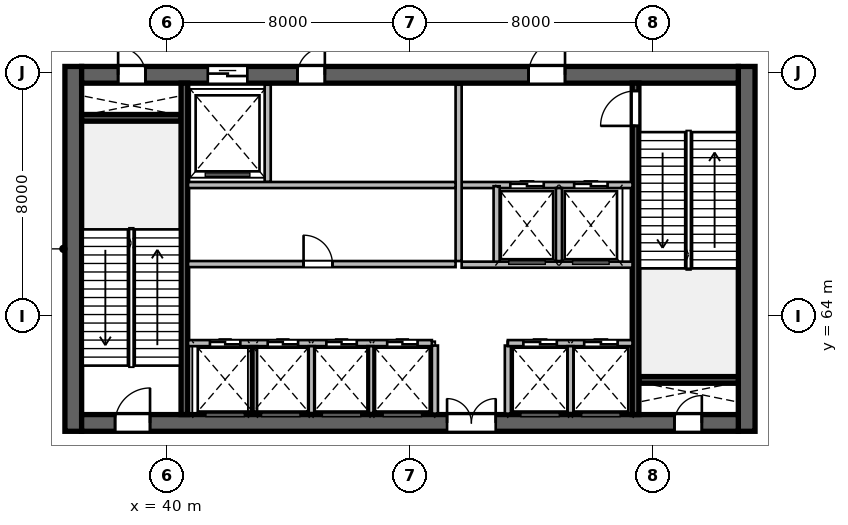
"""IFC4 building model, lengths in metres.
Left out: names, types, materials, properties, quantities, classifications, styles, units other than length and angle.
Written with IfcOpenShell. Run it as: python <this file> out.ifc"""

import sys

from ifc_helpers import new_model, si_unit, direction, frame, frame_2d, origin, place, context, subcontext, project, spatial, rectangle, extrude, source, transform, mapped, element, fill, save


model = new_model("IFC4")
c1 = context("Model", 3, precision=1e-05, world=origin(), true_north=direction((0.0, 1.0)))
c2 = subcontext(c1, "Body", "Model", "MODEL_VIEW")
j1 = project(units=[si_unit("LENGTHUNIT", "METRE"), si_unit("PLANEANGLEUNIT", "RADIAN")], contexts=[c1])
p1 = place(None, origin())
s1 = spatial("IfcSite", under=j1, at=p1, CompositionType="ELEMENT")
p2 = place(p1, origin())
s2 = spatial("IfcBuilding", under=s1, at=p2, CompositionType="ELEMENT")
p3 = place(p2, origin())
s3 = spatial("IfcBuildingStorey", under=s2, at=p3, CompositionType="ELEMENT", Elevation=0.0)
m1 = source(origin(), c2, "Body", "SweptSolid", [
    extrude(rectangle(XDim=12.0, YDim=0.55, at=frame_2d((6.0, 0.0))), origin(), (0.0, 0.0, 1.0), 6.0),
])
for number, where, z_axis, x_axis in (
    (1, (36.925, 60.2, 0.0), (0.0, 0.0, 1.0), (0.0, 1.0, 0.0)),
    (2, (59.075, 60.2, 0.0), (0.0, 0.0, 1.0), (0.0, 1.0, 0.0)),
):
    element("IfcWall", number, at=place(p3, frame(where, z_axis=z_axis, x_axis=x_axis)), inside=s3, PredefinedType="SHEAR", context=c2, shape_type="MappedRepresentation", body=[
        mapped(m1, transform((0.0, 0.0, 0.0), scale=1.0)),
    ])
m2 = source(origin(), c2, "Body", "SweptSolid", [
    extrude(rectangle(XDim=21.6, YDim=0.55, at=frame_2d((10.8, 0.0))), origin(), (0.0, 0.0, 1.0), 6.0),
])
p4 = place(p3, frame((37.2, 60.475, 0.0), z_axis=(0.0, 0.0, 1.0), x_axis=(1.0, 0.0, 0.0)))
e3 = element("IfcWall", 3, at=p4, inside=s3, PredefinedType="SHEAR", context=c2, shape_type="MappedRepresentation", body=[
    mapped(m2, transform((0.0, 0.0, 0.0), scale=1.0)),
])
p5 = place(p4, frame((1.1, 0.0, 0.0)))
e4 = element("IfcOpeningElement", 4, at=p5, cuts=e3, PredefinedType="OPENING", context=c2, shape_type="SweptSolid", body=[
    extrude(rectangle(XDim=1.15, YDim=2.15, at=frame_2d((0.575, 1.075))), frame((0.0, 0.285, 0.0), z_axis=(0.0, -1.0, 0.0), x_axis=(1.0, 0.0, 0.0)), (0.0, 0.0, 1.0), 0.57),
])
p6 = place(p4, frame((19.5, 0.0, 0.0)))
e5 = element("IfcOpeningElement", 5, at=p6, cuts=e3, PredefinedType="OPENING", context=c2, shape_type="SweptSolid", body=[
    extrude(rectangle(XDim=0.9, YDim=2.1, at=frame_2d((0.45, 1.05))), frame((0.0, 0.285, 0.0), z_axis=(0.0, -1.0, 0.0), x_axis=(1.0, 0.0, 0.0)), (0.0, 0.0, 1.0), 0.57),
])
p7 = place(p4, frame((12.02, 0.0, 0.0)))
e6 = element("IfcOpeningElement", 6, at=p7, cuts=e3, PredefinedType="OPENING", context=c2, shape_type="SweptSolid", body=[
    extrude(rectangle(XDim=1.6, YDim=2.15, at=frame_2d((0.8, 1.075))), frame((0.0, 0.285, 0.0), z_axis=(0.0, -1.0, 0.0), x_axis=(1.0, 0.0, 0.0)), (0.0, 0.0, 1.0), 0.57),
])
p8 = place(p3, frame((37.2, 71.925, 0.0), z_axis=(0.0, 0.0, 1.0), x_axis=(1.0, 0.0, 0.0)))
e7 = element("IfcWall", 7, at=p8, inside=s3, PredefinedType="SHEAR", context=c2, shape_type="MappedRepresentation", body=[
    mapped(m2, transform((0.0, 0.0, 0.0), scale=1.0)),
])
p9 = place(p8, frame((1.2, 0.0, 0.0)))
e8 = element("IfcOpeningElement", 8, at=p9, cuts=e7, PredefinedType="OPENING", context=c2, shape_type="SweptSolid", body=[
    extrude(rectangle(XDim=0.9, YDim=2.1, at=frame_2d((0.45, 1.05))), frame((0.0, 0.285, 0.0), z_axis=(0.0, -1.0, 0.0), x_axis=(1.0, 0.0, 0.0)), (0.0, 0.0, 1.0), 0.57),
])
p10 = place(p8, frame((14.7, 0.0, 0.0)))
e9 = element("IfcOpeningElement", 9, at=p10, cuts=e7, PredefinedType="OPENING", context=c2, shape_type="SweptSolid", body=[
    extrude(rectangle(XDim=1.2, YDim=2.15, at=frame_2d((0.6, 1.075))), frame((0.0, 0.285, 0.0), z_axis=(0.0, -1.0, 0.0), x_axis=(1.0, 0.0, 0.0)), (0.0, 0.0, 1.0), 0.57),
])
p11 = place(p8, frame((4.15, 0.0, 0.0)))
e10 = element("IfcOpeningElement", 10, at=p11, cuts=e7, PredefinedType="OPENING", context=c2, shape_type="SweptSolid", body=[
    extrude(rectangle(XDim=1.3, YDim=2.15, at=frame_2d((0.65, 1.075))), frame((0.0, 0.285, 0.0), z_axis=(0.0, -1.0, 0.0), x_axis=(1.0, 0.0, 0.0)), (0.0, 0.0, 1.0), 0.57),
])
p12 = place(p8, frame((7.1, 0.0, 0.0)))
e11 = element("IfcOpeningElement", 11, at=p12, cuts=e7, PredefinedType="OPENING", context=c2, shape_type="SweptSolid", body=[
    extrude(rectangle(XDim=0.9, YDim=2.1, at=frame_2d((0.45, 1.05))), frame((0.0, 0.285, 0.0), z_axis=(0.0, -1.0, 0.0), x_axis=(1.0, 0.0, 0.0)), (0.0, 0.0, 1.0), 0.57),
])
m3 = source(origin(), c2, "Body", "SweptSolid", [
    extrude(rectangle(XDim=3.27, YDim=0.22, at=frame_2d((1.635, 0.0))), origin(), (0.0, 0.0, 1.0), 6.0),
])
for number, where, z_axis, x_axis in (
    (12, (37.2, 70.51, 0.0), (0.0, 0.0, 1.0), (1.0, 0.0, 0.0)),
    (13, (55.53, 61.89, 0.0), (0.0, 0.0, 1.0), (1.0, 0.0, 0.0)),
):
    element("IfcWall", number, at=place(p3, frame(where, z_axis=z_axis, x_axis=x_axis)), inside=s3, PredefinedType="SHEAR", context=c2, shape_type="MappedRepresentation", body=[
        mapped(m3, transform((0.0, 0.0, 0.0), scale=1.0)),
    ])
m4 = source(origin(), c2, "Body", "SweptSolid", [
    extrude(rectangle(XDim=10.9, YDim=0.22, at=frame_2d((5.45, 0.0))), origin(), (0.0, 0.0, 1.0), 6.0),
])
p13 = place(p3, frame((40.58, 60.75, 0.0), z_axis=(0.0, 0.0, 1.0), x_axis=(0.0, 1.0, 0.0)))
e14 = element("IfcWall", 14, at=p13, inside=s3, PredefinedType="SHEAR", context=c2, shape_type="MappedRepresentation", body=[
    mapped(m4, transform((0.0, 0.0, 0.0), scale=1.0)),
])
p14 = place(p3, frame((55.42, 60.75, 0.0), z_axis=(0.0, 0.0, 1.0), x_axis=(0.0, 1.0, 0.0)))
e15 = element("IfcWall", 15, at=p14, inside=s3, PredefinedType="SHEAR", context=c2, shape_type="MappedRepresentation", body=[
    mapped(m4, transform((0.0, 0.0, 0.0), scale=1.0)),
])
p15 = place(p14, frame((9.495, 0.0, 0.0)))
e16 = element("IfcOpeningElement", 16, at=p15, cuts=e15, PredefinedType="OPENING", context=c2, shape_type="SweptSolid", body=[
    extrude(rectangle(XDim=1.15, YDim=2.15, at=frame_2d((0.575, 1.075))), frame((0.0, 0.12, 0.0), z_axis=(0.0, -1.0, 0.0), x_axis=(1.0, 0.0, 0.0)), (0.0, 0.0, 1.0), 0.24),
])
m5 = source(origin(), c2, "Body", "SweptSolid", [
    extrude(rectangle(XDim=2.24, YDim=0.2, at=frame_2d((1.12, 0.0))), origin(), (0.0, 0.0, 1.0), 5.7),
])
for number, where, z_axis, x_axis in (
    (17, (48.82, 60.78, 0.0), (0.0, 0.0, 1.0), (0.0, 1.0, 0.0)),
    (18, (51.22, 60.78, 0.0), (0.0, 0.0, 1.0), (0.0, 1.0, 0.0)),
):
    element("IfcWall", number, at=place(p3, frame(where, z_axis=z_axis, x_axis=x_axis)), inside=s3, PredefinedType="SOLIDWALL", context=c2, shape_type="MappedRepresentation", body=[
        mapped(m5, transform((0.0, 0.0, 0.0), scale=1.0)),
    ])
m6 = source(origin(), c2, "Body", "SweptSolid", [
    extrude(rectangle(XDim=5.62, YDim=0.2, at=frame_2d((2.81, 0.0))), origin(), (0.0, 0.0, 1.0), 5.7),
])
p16 = place(p3, frame((49.7, 68.3, 0.0), z_axis=(0.0, 0.0, 1.0), x_axis=(1.0, 0.0, 0.0)))
e19 = element("IfcWall", 19, at=p16, inside=s3, PredefinedType="SOLIDWALL", context=c2, shape_type="MappedRepresentation", body=[
    mapped(m6, transform((0.0, 0.0, 0.0), scale=1.0)),
])
p17 = place(p16, frame((1.6, 0.0, 0.0)))
e20 = element("IfcOpeningElement", 20, at=p17, cuts=e19, PredefinedType="OPENING", context=c2, shape_type="SweptSolid", body=[
    extrude(rectangle(XDim=1.1, YDim=2.15, at=frame_2d((0.55, 1.075))), frame((0.0, 0.11, 0.0), z_axis=(0.0, -1.0, 0.0), x_axis=(1.0, 0.0, 0.0)), (0.0, 0.0, 1.0), 0.22),
])
p18 = place(p16, frame((3.7, 0.0, 0.0)))
e21 = element("IfcOpeningElement", 21, at=p18, cuts=e19, PredefinedType="OPENING", context=c2, shape_type="SweptSolid", body=[
    extrude(rectangle(XDim=1.1, YDim=2.15, at=frame_2d((0.55, 1.075))), frame((0.0, 0.11, 0.0), z_axis=(0.0, -1.0, 0.0), x_axis=(1.0, 0.0, 0.0)), (0.0, 0.0, 1.0), 0.22),
])
m7 = source(origin(), c2, "Body", "SweptSolid", [
    extrude(rectangle(XDim=5.8, YDim=0.2, at=frame_2d((2.9, 0.0))), origin(), (0.0, 0.0, 1.0), 5.7),
])
p19 = place(p3, frame((49.6, 65.8, 0.0), z_axis=(0.0, 0.0, 1.0), x_axis=(0.0, 1.0, 0.0)))
e22 = element("IfcWall", 22, at=p19, inside=s3, PredefinedType="SOLIDWALL", context=c2, shape_type="MappedRepresentation", body=[
    mapped(m7, transform((0.0, 0.0, 0.0), scale=1.0)),
])
m8 = source(origin(), c2, "Body", "SweptSolid", [
    extrude(rectangle(XDim=2.58, YDim=0.2, at=frame_2d((1.29, 0.0))), origin(), (0.0, 0.0, 1.0), 5.7),
])
p20 = place(p3, frame((50.85, 65.68, 0.0), z_axis=(0.0, 0.0, 1.0), x_axis=(0.0, 1.0, 0.0)))
e23 = element("IfcWall", 23, at=p20, inside=s3, PredefinedType="SOLIDWALL", context=c2, shape_type="MappedRepresentation", body=[
    mapped(m8, transform((0.0, 0.0, 0.0), scale=1.0)),
])
m9 = source(origin(), c2, "Body", "SweptSolid", [
    extrude(rectangle(XDim=2.4, YDim=0.2, at=frame_2d((1.2, 0.0))), origin(), (0.0, 0.0, 1.0), 5.7),
])
p21 = place(p3, frame((52.9, 65.8, 0.0), z_axis=(0.0, 0.0, 1.0), x_axis=(0.0, 1.0, 0.0)))
e24 = element("IfcWall", 24, at=p21, inside=s3, PredefinedType="SOLIDWALL", context=c2, shape_type="MappedRepresentation", body=[
    mapped(m9, transform((0.0, 0.0, 0.0), scale=1.0)),
])
p22 = place(p3, frame((49.7, 65.68, 0.0), z_axis=(0.0, 0.0, 1.0), x_axis=(1.0, 0.0, 0.0)))
e25 = element("IfcWall", 25, at=p22, inside=s3, PredefinedType="SOLIDWALL", context=c2, shape_type="MappedRepresentation", body=[
    mapped(m6, transform((0.0, 0.0, 0.0), scale=1.0)),
])
m10 = source(origin(), c2, "Body", "SweptSolid", [
    extrude(rectangle(XDim=3.2, YDim=0.2, at=frame_2d((1.6, 0.0))), origin(), (0.0, 0.0, 1.0), 5.7),
])
p23 = place(p3, frame((43.32, 68.4, 0.0), z_axis=(0.0, 0.0, 1.0), x_axis=(0.0, 1.0, 0.0)))
e26 = element("IfcWall", 26, at=p23, inside=s3, PredefinedType="SOLIDWALL", context=c2, shape_type="MappedRepresentation", body=[
    mapped(m10, transform((0.0, 0.0, 0.0), scale=1.0)),
])
m11 = source(origin(), c2, "Body", "SweptSolid", [
    extrude(rectangle(XDim=8.8, YDim=0.2, at=frame_2d((4.4, 0.0))), origin(), (0.0, 0.0, 1.0), 5.7),
])
p24 = place(p3, frame((40.7, 68.3, 0.0), z_axis=(0.0, 0.0, 1.0), x_axis=(1.0, 0.0, 0.0)))
e27 = element("IfcWall", 27, at=p24, inside=s3, PredefinedType="SOLIDWALL", context=c2, shape_type="MappedRepresentation", body=[
    mapped(m11, transform((0.0, 0.0, 0.0), scale=1.0)),
])
m12 = source(origin(), c2, "Body", "SweptSolid", [
    extrude(rectangle(XDim=8.02, YDim=0.2, at=frame_2d((4.01, 0.0))), origin(), (0.0, 0.0, 1.0), 5.7),
])
p25 = place(p3, frame((40.7, 63.1, 0.0), z_axis=(0.0, 0.0, 1.0), x_axis=(1.0, 0.0, 0.0)))
e28 = element("IfcWall", 28, at=p25, inside=s3, PredefinedType="SOLIDWALL", context=c2, shape_type="MappedRepresentation", body=[
    mapped(m12, transform((0.0, 0.0, 0.0), scale=1.0)),
])
p26 = place(p25, frame((0.72, 0.0, 0.0)))
e29 = element("IfcOpeningElement", 29, at=p26, cuts=e28, PredefinedType="OPENING", context=c2, shape_type="SweptSolid", body=[
    extrude(rectangle(XDim=1.0, YDim=2.15, at=frame_2d((0.5, 1.075))), frame((0.0, 0.11, 0.0), z_axis=(0.0, -1.0, 0.0), x_axis=(1.0, 0.0, 0.0)), (0.0, 0.0, 1.0), 0.22),
])
p27 = place(p25, frame((2.62, 0.0, 0.0)))
e30 = element("IfcOpeningElement", 30, at=p27, cuts=e28, PredefinedType="OPENING", context=c2, shape_type="SweptSolid", body=[
    extrude(rectangle(XDim=1.0, YDim=2.15, at=frame_2d((0.5, 1.075))), frame((0.0, 0.11, 0.0), z_axis=(0.0, -1.0, 0.0), x_axis=(1.0, 0.0, 0.0)), (0.0, 0.0, 1.0), 0.22),
])
p28 = place(p25, frame((4.55, 0.0, 0.0)))
e31 = element("IfcOpeningElement", 31, at=p28, cuts=e28, PredefinedType="OPENING", context=c2, shape_type="SweptSolid", body=[
    extrude(rectangle(XDim=1.0, YDim=2.15, at=frame_2d((0.5, 1.075))), frame((0.0, 0.11, 0.0), z_axis=(0.0, -1.0, 0.0), x_axis=(1.0, 0.0, 0.0)), (0.0, 0.0, 1.0), 0.22),
])
p29 = place(p25, frame((6.55, 0.0, 0.0)))
e32 = element("IfcOpeningElement", 32, at=p29, cuts=e28, PredefinedType="OPENING", context=c2, shape_type="SweptSolid", body=[
    extrude(rectangle(XDim=1.0, YDim=2.15, at=frame_2d((0.5, 1.075))), frame((0.0, 0.11, 0.0), z_axis=(0.0, -1.0, 0.0), x_axis=(1.0, 0.0, 0.0)), (0.0, 0.0, 1.0), 0.22),
])
m13 = source(origin(), c2, "Body", "SweptSolid", [
    extrude(rectangle(XDim=4.1, YDim=0.2, at=frame_2d((2.05, 0.0))), origin(), (0.0, 0.0, 1.0), 5.7),
])
p30 = place(p3, frame((51.22, 63.1, 0.0), z_axis=(0.0, 0.0, 1.0), x_axis=(1.0, 0.0, 0.0)))
e33 = element("IfcWall", 33, at=p30, inside=s3, PredefinedType="SOLIDWALL", context=c2, shape_type="MappedRepresentation", body=[
    mapped(m13, transform((0.0, 0.0, 0.0), scale=1.0)),
])
p31 = place(p30, frame((0.51, 0.0, 0.0)))
e34 = element("IfcOpeningElement", 34, at=p31, cuts=e33, PredefinedType="OPENING", context=c2, shape_type="SweptSolid", body=[
    extrude(rectangle(XDim=1.1, YDim=2.15, at=frame_2d((0.55, 1.075))), frame((0.0, 0.11, 0.0), z_axis=(0.0, -1.0, 0.0), x_axis=(1.0, 0.0, 0.0)), (0.0, 0.0, 1.0), 0.22),
])
p32 = place(p30, frame((2.51, 0.0, 0.0)))
e35 = element("IfcOpeningElement", 35, at=p32, cuts=e33, PredefinedType="OPENING", context=c2, shape_type="SweptSolid", body=[
    extrude(rectangle(XDim=1.1, YDim=2.15, at=frame_2d((0.55, 1.075))), frame((0.0, 0.11, 0.0), z_axis=(0.0, -1.0, 0.0), x_axis=(1.0, 0.0, 0.0)), (0.0, 0.0, 1.0), 0.22),
])
m14 = source(origin(), c2, "Body", "SweptSolid", [
    extrude(rectangle(XDim=2.2, YDim=0.2, at=frame_2d((1.1, 0.0))), origin(), (0.0, 0.0, 1.0), 5.7),
])
for number, where, z_axis, x_axis in (
    (36, (42.87, 60.8, 0.0), (0.0, 0.0, 1.0), (0.0, 1.0, 0.0)),
    (37, (44.77, 60.8, 0.0), (0.0, 0.0, 1.0), (0.0, 1.0, 0.0)),
    (38, (46.7, 60.8, 0.0), (0.0, 0.0, 1.0), (0.0, 1.0, 0.0)),
    (39, (53.28, 60.8, 0.0), (0.0, 0.0, 1.0), (0.0, 1.0, 0.0)),
):
    element("IfcWall", number, at=place(p3, frame(where, z_axis=z_axis, x_axis=x_axis)), inside=s3, PredefinedType="SOLIDWALL", context=c2, shape_type="MappedRepresentation", body=[
        mapped(m14, transform((0.0, 0.0, 0.0), scale=1.0)),
    ])
p33 = place(p3, frame((40.7, 65.7, 0.0), z_axis=(0.0, 0.0, 1.0), x_axis=(1.0, 0.0, 0.0)))
e40 = element("IfcWall", 40, at=p33, inside=s3, PredefinedType="SOLIDWALL", context=c2, shape_type="MappedRepresentation", body=[
    mapped(m11, transform((0.0, 0.0, 0.0), scale=1.0)),
])
p34 = place(p33, frame((3.8, 0.0, 0.0)))
e41 = element("IfcOpeningElement", 41, at=p34, cuts=e40, PredefinedType="OPENING", context=c2, shape_type="SweptSolid", body=[
    extrude(rectangle(XDim=0.95, YDim=2.15, at=frame_2d((0.475, 1.075))), frame((0.0, 0.11, 0.0), z_axis=(0.0, -1.0, 0.0), x_axis=(1.0, 0.0, 0.0)), (0.0, 0.0, 1.0), 0.22),
])
m15 = source(origin(), c2, "Body", "SweptSolid", [
    extrude(rectangle(XDim=1.15, YDim=2.15, at=frame_2d((0.575, 1.075))), frame((0.0, 0.025, 0.0), z_axis=(0.0, -1.0, 0.0), x_axis=(1.0, 0.0, 0.0)), (0.0, 0.0, 1.0), 0.05),
])
p35 = place(p5, origin())
e42 = element("IfcDoor", 42, at=p35, inside=s3, OperationType="SINGLE_SWING_RIGHT", PredefinedType="DOOR", context=c2, shape_type="MappedRepresentation", body=[
    mapped(m15, transform((0.0, 0.0, 0.0), scale=1.0)),
])
fill(e4, e42)
m16 = source(origin(), c2, "Body", "SweptSolid", [
    extrude(rectangle(XDim=0.9, YDim=2.1, at=frame_2d((0.45, 1.05))), frame((0.0, 0.025, 0.0), z_axis=(0.0, -1.0, 0.0), x_axis=(1.0, 0.0, 0.0)), (0.0, 0.0, 1.0), 0.05),
])
p36 = place(p9, origin())
e43 = element("IfcDoor", 43, at=p36, inside=s3, OperationType="SINGLE_SWING_LEFT", PredefinedType="DOOR", context=c2, shape_type="MappedRepresentation", body=[
    mapped(m16, transform((0.0, 0.0, 0.0), scale=1.0)),
])
fill(e8, e43)
p37 = place(p6, origin())
e44 = element("IfcDoor", 44, at=p37, inside=s3, OperationType="SINGLE_SWING_RIGHT", PredefinedType="DOOR", context=c2, shape_type="MappedRepresentation", body=[
    mapped(m16, transform((0.0, 0.0, 0.0), scale=1.0)),
])
fill(e5, e44)
p38 = place(p15, origin())
e45 = element("IfcDoor", 45, at=p38, inside=s3, OperationType="SINGLE_SWING_LEFT", PredefinedType="DOOR", context=c2, shape_type="MappedRepresentation", body=[
    mapped(m15, transform((0.0, 0.0, 0.0), scale=1.0)),
])
fill(e16, e45)
m17 = source(origin(), c2, "Body", "SweptSolid", [
    extrude(rectangle(XDim=1.6, YDim=2.15, at=frame_2d((0.8, 1.075))), frame((0.0, 0.025, 0.0), z_axis=(0.0, -1.0, 0.0), x_axis=(1.0, 0.0, 0.0)), (0.0, 0.0, 1.0), 0.05),
])
p39 = place(p7, origin())
e46 = element("IfcDoor", 46, at=p39, inside=s3, OperationType="DOUBLE_DOOR_SINGLE_SWING", PredefinedType="DOOR", context=c2, shape_type="MappedRepresentation", body=[
    mapped(m17, transform((0.0, 0.0, 0.0), scale=1.0)),
])
fill(e6, e46)
m18 = source(origin(), c2, "Body", "SweptSolid", [
    extrude(rectangle(XDim=1.2, YDim=2.15, at=frame_2d((0.6, 1.075))), frame((0.0, 0.025, 0.0), z_axis=(0.0, -1.0, 0.0), x_axis=(1.0, 0.0, 0.0)), (0.0, 0.0, 1.0), 0.05),
])
p40 = place(p10, origin())
e47 = element("IfcDoor", 47, at=p40, inside=s3, OperationType="SINGLE_SWING_RIGHT", PredefinedType="DOOR", context=c2, shape_type="MappedRepresentation", body=[
    mapped(m18, transform((0.0, 0.0, 0.0), scale=1.0)),
])
fill(e9, e47)
m19 = source(origin(), c2, "Body", "SweptSolid", [
    extrude(rectangle(XDim=1.1, YDim=2.15, at=frame_2d((0.55, 1.075))), frame((0.0, 0.025, 0.0), z_axis=(0.0, -1.0, 0.0), x_axis=(1.0, 0.0, 0.0)), (0.0, 0.0, 1.0), 0.05),
])
p41 = place(p17, origin())
e48 = element("IfcDoor", 48, at=p41, inside=s3, OperationType="DOUBLE_DOOR_SLIDING", PredefinedType="DOOR", context=c2, shape_type="MappedRepresentation", body=[
    mapped(m19, transform((0.0, 0.0, 0.0), scale=1.0)),
])
fill(e20, e48)
p42 = place(p18, origin())
e49 = element("IfcDoor", 49, at=p42, inside=s3, OperationType="DOUBLE_DOOR_SLIDING", PredefinedType="DOOR", context=c2, shape_type="MappedRepresentation", body=[
    mapped(m19, transform((0.0, 0.0, 0.0), scale=1.0)),
])
fill(e21, e49)
m20 = source(origin(), c2, "Body", "SweptSolid", [
    extrude(rectangle(XDim=1.3, YDim=2.15, at=frame_2d((0.65, 1.075))), frame((0.0, 0.025, 0.0), z_axis=(0.0, -1.0, 0.0), x_axis=(1.0, 0.0, 0.0)), (0.0, 0.0, 1.0), 0.05),
])
p43 = place(p11, origin())
e50 = element("IfcDoor", 50, at=p43, inside=s3, OperationType="DOUBLE_DOOR_SLIDING", PredefinedType="DOOR", context=c2, shape_type="MappedRepresentation", body=[
    mapped(m20, transform((0.0, 0.0, 0.0), scale=1.0)),
])
fill(e10, e50)
p44 = place(p12, origin())
e51 = element("IfcDoor", 51, at=p44, inside=s3, OperationType="SINGLE_SWING_RIGHT", PredefinedType="DOOR", context=c2, shape_type="MappedRepresentation", body=[
    mapped(m16, transform((0.0, 0.0, 0.0), scale=1.0)),
])
fill(e11, e51)
m21 = source(origin(), c2, "Body", "SweptSolid", [
    extrude(rectangle(XDim=1.0, YDim=2.15, at=frame_2d((0.5, 1.075))), frame((0.0, 0.025, 0.0), z_axis=(0.0, -1.0, 0.0), x_axis=(1.0, 0.0, 0.0)), (0.0, 0.0, 1.0), 0.05),
])
p45 = place(p26, origin())
e52 = element("IfcDoor", 52, at=p45, inside=s3, OperationType="DOUBLE_DOOR_SLIDING", PredefinedType="DOOR", context=c2, shape_type="MappedRepresentation", body=[
    mapped(m21, transform((0.0, 0.0, 0.0), scale=1.0)),
])
fill(e29, e52)
p46 = place(p27, origin())
e53 = element("IfcDoor", 53, at=p46, inside=s3, OperationType="DOUBLE_DOOR_SLIDING", PredefinedType="DOOR", context=c2, shape_type="MappedRepresentation", body=[
    mapped(m21, transform((0.0, 0.0, 0.0), scale=1.0)),
])
fill(e30, e53)
p47 = place(p28, origin())
e54 = element("IfcDoor", 54, at=p47, inside=s3, OperationType="DOUBLE_DOOR_SLIDING", PredefinedType="DOOR", context=c2, shape_type="MappedRepresentation", body=[
    mapped(m21, transform((0.0, 0.0, 0.0), scale=1.0)),
])
fill(e31, e54)
p48 = place(p29, origin())
e55 = element("IfcDoor", 55, at=p48, inside=s3, OperationType="DOUBLE_DOOR_SLIDING", PredefinedType="DOOR", context=c2, shape_type="MappedRepresentation", body=[
    mapped(m21, transform((0.0, 0.0, 0.0), scale=1.0)),
])
fill(e32, e55)
m22 = source(origin(), c2, "Body", "SweptSolid", [
    extrude(rectangle(XDim=1.1, YDim=2.15, at=frame_2d((0.55, 1.075))), frame((0.0, 0.025, 0.0), z_axis=(0.0, -1.0, 0.0), x_axis=(1.0, 0.0, 0.0)), (0.0, 0.0, 1.0), 0.05),
])
p49 = place(p31, origin())
e56 = element("IfcDoor", 56, at=p49, inside=s3, OperationType="DOUBLE_DOOR_SLIDING", PredefinedType="DOOR", context=c2, shape_type="MappedRepresentation", body=[
    mapped(m22, transform((0.0, 0.0, 0.0), scale=1.0)),
])
fill(e34, e56)
p50 = place(p32, origin())
e57 = element("IfcDoor", 57, at=p50, inside=s3, OperationType="DOUBLE_DOOR_SLIDING", PredefinedType="DOOR", context=c2, shape_type="MappedRepresentation", body=[
    mapped(m22, transform((0.0, 0.0, 0.0), scale=1.0)),
])
fill(e35, e57)
m23 = source(origin(), c2, "Body", "SweptSolid", [
    extrude(rectangle(XDim=0.95, YDim=2.15, at=frame_2d((0.475, 1.075))), frame((0.0, 0.025, 0.0), z_axis=(0.0, -1.0, 0.0), x_axis=(1.0, 0.0, 0.0)), (0.0, 0.0, 1.0), 0.05),
])
p51 = place(p34, origin())
e58 = element("IfcDoor", 58, at=p51, inside=s3, OperationType="SINGLE_SWING_LEFT", PredefinedType="DOOR", context=c2, shape_type="MappedRepresentation", body=[
    mapped(m23, transform((0.0, 0.0, 0.0), scale=1.0)),
])
fill(e41, e58)
save(model, sys.argv[1])
